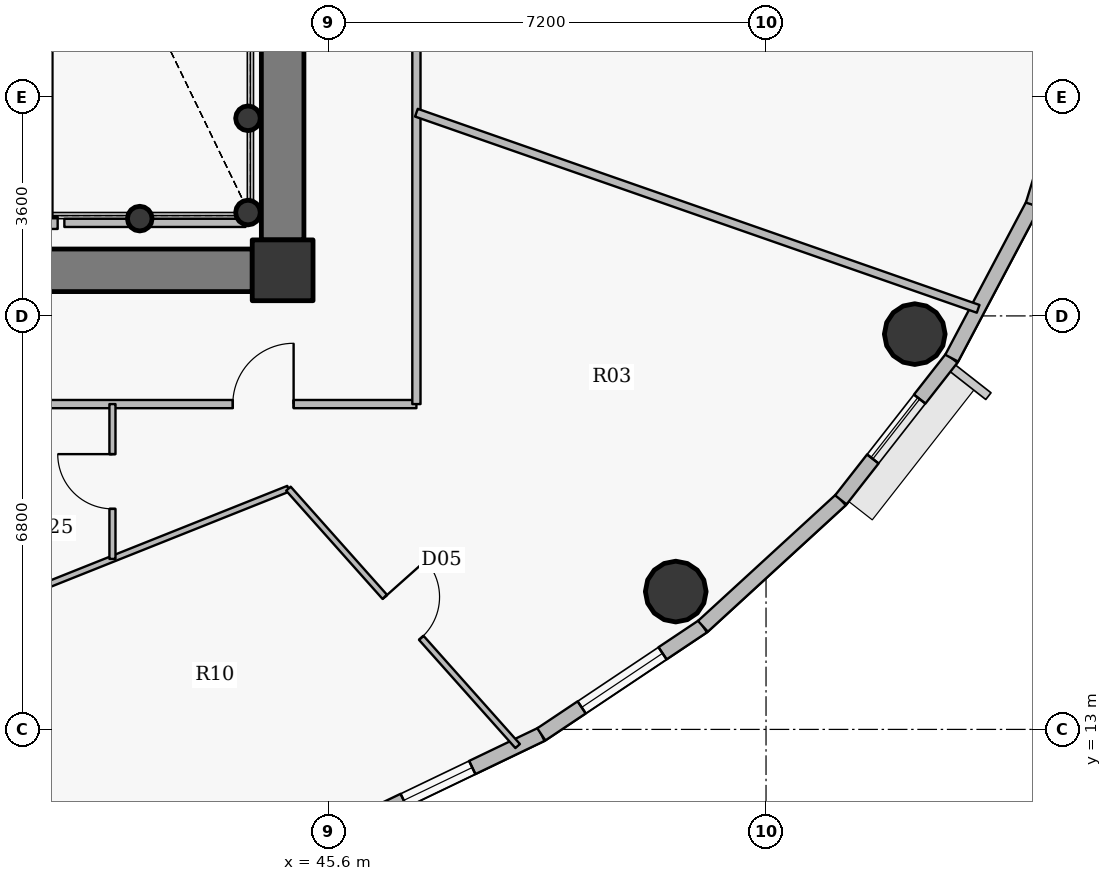
"""IFC4 building model, lengths in metres.
Left out: names, types, materials, properties, quantities, classifications, styles, units other than length and angle.
Written with IfcOpenShell. Run it as: python <this file> out.ifc"""

import sys

from ifc_helpers import new_model, si_unit, direction, frame, frame_2d, origin, origin_2d, place, context, subcontext, project, spatial, rectangle, hollow_circle, extrude, source, transform, mapped, element, fill, save


model = new_model("IFC4")
c1 = context("Model", 3, precision=1e-05, world=origin(), true_north=direction((0.0, 1.0)))
c2 = subcontext(c1, "Body", "Model", "MODEL_VIEW")
j1 = project(units=[si_unit("LENGTHUNIT", "METRE"), si_unit("PLANEANGLEUNIT", "RADIAN")], contexts=[c1])
p1 = place(None, origin())
s1 = spatial("IfcSite", under=j1, at=p1, CompositionType="ELEMENT")
p2 = place(p1, origin())
s2 = spatial("IfcBuilding", under=s1, at=p2, CompositionType="ELEMENT")
p3 = place(p2, frame((0.0, 0.0, 299.25)))
s3 = spatial("IfcBuildingStorey", under=s2, at=p3, CompositionType="ELEMENT", Elevation=299.25)
p4 = place(p3, frame((44.85, 20.55, 0.0), z_axis=(0.0, 0.0, 1.0), x_axis=(1.0, 0.0, 0.0)))
e1 = element("IfcColumn", 1, at=p4, inside=s3, PredefinedType="COLUMN", context=c2, shape_type="SweptSolid", body=[
    extrude(rectangle(XDim=1.0, YDim=1.0, at=origin_2d()), origin(), (0.0, 0.0, 1.0), 3.75),
])
for number, where, z_axis, x_axis in (
    (2, (44.28, 21.5, 0.0), (0.0, 0.0, 1.0), (1.0, 0.0, 0.0)),
    (3, (44.28, 23.05, 0.0), (0.0, 0.0, 1.0), (1.0, 0.0, 0.0)),
    (4, (42.5, 21.4, 0.0), (0.0, 0.0, 1.0), (1.0, 0.0, 0.0)),
):
    element("IfcColumn", number, at=place(p3, frame(where, z_axis=z_axis, x_axis=x_axis)), inside=s3, PredefinedType="COLUMN", context=c2, shape_type="SweptSolid", body=[
        extrude(hollow_circle(Radius=0.203, WallThickness=0.016, at=origin_2d()), origin(), (0.0, 0.0, 1.0), 3.75),
    ])
p5 = place(p3, frame((44.85, 32.95, 0.0), z_axis=(0.0, 0.0, 1.0), x_axis=(0.0, -1.0, 0.0)))
e5 = element("IfcWall", 5, at=p5, inside=s3, PredefinedType="SHEAR", context=c2, shape_type="SweptSolid", body=[
    extrude(rectangle(XDim=11.9, YDim=0.7, at=frame_2d((5.95, 0.0))), origin(), (0.0, 0.0, 1.0), 3.05),
])
p6 = place(p3, frame((44.35, 20.55, 0.0), z_axis=(0.0, 0.0, 1.0), x_axis=(-1.0, 0.0, 0.0)))
e6 = element("IfcWall", 6, at=p6, inside=s3, PredefinedType="SHEAR", context=c2, shape_type="SweptSolid", body=[
    extrude(rectangle(XDim=16.7, YDim=0.7, at=frame_2d((8.35, 0.0))), origin(), (0.0, 0.0, 1.0), 3.05),
])
p7 = place(p6, frame((12.925, 0.0, 0.0)))
e7 = element("IfcOpeningElement", 7, at=p7, cuts=e6, PredefinedType="OPENING", context=c2, shape_type="SweptSolid", body=[
    extrude(rectangle(XDim=1.15, YDim=2.15, at=origin_2d()), frame((0.575, 0.36, 1.075), z_axis=(0.0, -1.0, 0.0), x_axis=(1.0, 0.0, 0.0)), (0.0, 0.0, 1.0), 0.72),
])
p8 = place(p6, frame((9.1, 0.0, 0.0)))
e8 = element("IfcOpeningElement", 8, at=p8, cuts=e6, PredefinedType="OPENING", context=c2, shape_type="SweptSolid", body=[
    extrude(rectangle(XDim=1.15, YDim=2.15, at=origin_2d()), frame((0.575, 0.36, 1.075), z_axis=(0.0, -1.0, 0.0), x_axis=(1.0, 0.0, 0.0)), (0.0, 0.0, 1.0), 0.72),
])
for number, where, z_axis, x_axis in (
    (9, (51.315, 15.267, 0.0), (0.0, 0.0, 1.0), (1.0, 0.0, 0.0)),
    (10, (55.246, 19.5, 0.0), (0.0, 0.0, 1.0), (1.0, 0.0, 0.0)),
):
    element("IfcColumn", number, at=place(p3, frame(where, z_axis=z_axis, x_axis=x_axis)), inside=s3, PredefinedType="COLUMN", context=c2, shape_type="SweptSolid", body=[
        extrude(hollow_circle(Radius=0.5, WallThickness=0.032, at=origin_2d()), origin(), (0.0, 0.0, 1.0), 3.75),
    ])
p9 = place(p3, frame((49.104, 12.918, 0.0), z_axis=(0.0, 0.0, 1.0), x_axis=(-0.901573741254, -0.43262546051, 0.0)))
e11 = element("IfcWall", 11, at=p9, inside=s3, PredefinedType="SOLIDWALL", context=c2, shape_type="SweptSolid", body=[
    extrude(rectangle(XDim=3.307, YDim=0.24, at=frame_2d((1.653, 0.0))), origin(), (0.0, 0.0, 1.0), 3.5),
])
p10 = place(p9, frame((1.26, 0.0, 0.9)))
e12 = element("IfcOpeningElement", 12, at=p10, cuts=e11, PredefinedType="OPENING", context=c2, shape_type="SweptSolid", body=[
    extrude(rectangle(XDim=1.25, YDim=1.65, at=origin_2d()), frame((0.625, 0.13, 0.825), z_axis=(0.0, -1.0, 0.0), x_axis=(1.0, 0.0, 0.0)), (0.0, 0.0, 1.0), 0.26),
])
p11 = place(p3, frame((51.762, 14.696, 0.0), z_axis=(0.0, 0.0, 1.0), x_axis=(-0.831250592635, -0.55589787933, 0.0)))
e13 = element("IfcWall", 13, at=p11, inside=s3, PredefinedType="SOLIDWALL", context=c2, shape_type="SweptSolid", body=[
    extrude(rectangle(XDim=3.197, YDim=0.24, at=frame_2d((1.599, 0.0))), origin(), (0.0, 0.0, 1.0), 3.5),
])
p12 = place(p11, frame((0.799, 0.0, 0.9)))
e14 = element("IfcOpeningElement", 14, at=p12, cuts=e13, PredefinedType="OPENING", context=c2, shape_type="SweptSolid", body=[
    extrude(rectangle(XDim=1.6, YDim=1.75, at=origin_2d()), frame((0.8, 0.13, 0.875), z_axis=(0.0, -1.0, 0.0), x_axis=(1.0, 0.0, 0.0)), (0.0, 0.0, 1.0), 0.26),
])
p13 = place(p3, frame((54.03, 16.775, 0.0), z_axis=(0.0, 0.0, 1.0), x_axis=(-0.737068506972, -0.675818034703, 0.0)))
e15 = element("IfcWall", 15, at=p13, inside=s3, PredefinedType="SOLIDWALL", context=c2, shape_type="SweptSolid", body=[
    extrude(rectangle(XDim=3.077, YDim=0.24, at=frame_2d((1.539, 0.0))), origin(), (0.0, 0.0, 1.0), 3.5),
])
p14 = place(p3, frame((55.854, 19.105, 0.0), z_axis=(0.0, 0.0, 1.0), x_axis=(-0.616337186556, -0.787482363275, 0.0)))
e16 = element("IfcWall", 16, at=p14, inside=s3, PredefinedType="SOLIDWALL", context=c2, shape_type="SweptSolid", body=[
    extrude(rectangle(XDim=2.958, YDim=0.24, at=frame_2d((1.479, 0.0))), origin(), (0.0, 0.0, 1.0), 3.5),
])
p15 = place(p14, frame((0.854, 0.0, 0.9)))
e17 = element("IfcOpeningElement", 17, at=p15, cuts=e16, PredefinedType="OPENING", context=c2, shape_type="SweptSolid", body=[
    extrude(rectangle(XDim=1.25, YDim=1.65, at=origin_2d()), frame((0.625, 0.13, 0.825), z_axis=(0.0, -1.0, 0.0), x_axis=(1.0, 0.0, 0.0)), (0.0, 0.0, 1.0), 0.26),
])
p16 = place(p3, frame((57.188, 21.628, 0.0), z_axis=(0.0, 0.0, 1.0), x_axis=(-0.467628269026, -0.883925224218, 0.0)))
e18 = element("IfcWall", 18, at=p16, inside=s3, PredefinedType="SOLIDWALL", context=c2, shape_type="SweptSolid", body=[
    extrude(rectangle(XDim=2.854, YDim=0.24, at=frame_2d((1.427, 0.0))), origin(), (0.0, 0.0, 1.0), 3.5),
])
p17 = place(p3, frame((58.002, 24.281, 0.0), z_axis=(0.0, 0.0, 1.0), x_axis=(-0.2931213403, -0.956075248012, 0.0)))
e19 = element("IfcWall", 19, at=p17, inside=s3, PredefinedType="SOLIDWALL", context=c2, shape_type="SweptSolid", body=[
    extrude(rectangle(XDim=2.775, YDim=0.24, at=frame_2d((1.388, 0.0))), origin(), (0.0, 0.0, 1.0), 3.5),
])
p18 = place(p17, frame((0.763, 0.0, 0.9)))
e20 = element("IfcOpeningElement", 20, at=p18, cuts=e19, PredefinedType="OPENING", context=c2, shape_type="SweptSolid", body=[
    extrude(rectangle(XDim=1.25, YDim=1.65, at=origin_2d()), frame((0.625, 0.13, 0.825), z_axis=(0.0, -1.0, 0.0), x_axis=(1.0, 0.0, 0.0)), (0.0, 0.0, 1.0), 0.26),
])
p19 = place(p3, frame((24.95, 18.35, 0.0), z_axis=(0.0, 0.0, 1.0), x_axis=(1.0, 0.0, 0.0)))
e21 = element("IfcWall", 21, at=p19, inside=s3, PredefinedType="PARTITIONING", context=c2, shape_type="SweptSolid", body=[
    extrude(rectangle(XDim=22.1, YDim=0.135, at=frame_2d((11.05, 0.0))), origin(), (0.0, 0.0, 1.0), 3.035),
])
p20 = place(p19, frame((8.131, 0.0, 0.0)))
e22 = element("IfcOpeningElement", 22, at=p20, cuts=e21, PredefinedType="OPENING", context=c2, shape_type="SweptSolid", body=[
    extrude(rectangle(XDim=1.0, YDim=2.15, at=origin_2d()), frame((0.5, 0.078, 1.075), z_axis=(0.0, -1.0, 0.0), x_axis=(1.0, 0.0, 0.0)), (0.0, 0.0, 1.0), 0.155),
])
p21 = place(p19, frame((19.081, 0.0, 0.0)))
e23 = element("IfcOpeningElement", 23, at=p21, cuts=e21, PredefinedType="OPENING", context=c2, shape_type="SweptSolid", body=[
    extrude(rectangle(XDim=1.0, YDim=2.15, at=origin_2d()), frame((0.5, 0.078, 1.075), z_axis=(0.0, -1.0, 0.0), x_axis=(1.0, 0.0, 0.0)), (0.0, 0.0, 1.0), 0.155),
])
p22 = place(p3, frame((40.845, 15.323, 0.0), z_axis=(0.0, 0.0, 1.0), x_axis=(0.928815810282, 0.370541752804, 0.0)))
e24 = element("IfcWall", 24, at=p22, inside=s3, PredefinedType="PARTITIONING", context=c2, shape_type="SweptSolid", body=[
    extrude(rectangle(XDim=4.414, YDim=0.1, at=frame_2d((2.207, 0.0))), origin(), (0.0, 0.0, 1.0), 3.035),
])
p23 = place(p3, frame((40.9, 21.33, 0.0), z_axis=(0.0, 0.0, 1.0), x_axis=(1.0, 0.0, 0.0)))
e25 = element("IfcWall", 25, at=p23, inside=s3, PredefinedType="PARTITIONING", context=c2, shape_type="SweptSolid", body=[
    extrude(rectangle(XDim=0.25, YDim=0.2, at=frame_2d((0.125, 0.0))), origin(), (0.0, 0.0, 1.0), 3.035),
])
p24 = place(p3, frame((42.051, 15.804, 0.0), z_axis=(0.0, 0.0, 1.0), x_axis=(0.0, 1.0, 0.0)))
e26 = element("IfcWall", 26, at=p24, inside=s3, PredefinedType="PARTITIONING", context=c2, shape_type="SweptSolid", body=[
    extrude(rectangle(XDim=2.546, YDim=0.1, at=frame_2d((1.273, 0.0))), origin(), (0.0, 0.0, 1.0), 3.5),
])
p25 = place(p24, frame((0.823, 0.0, 0.0)))
e27 = element("IfcOpeningElement", 27, at=p25, cuts=e26, PredefinedType="OPENING", context=c2, shape_type="SweptSolid", body=[
    extrude(rectangle(XDim=0.9, YDim=2.1, at=origin_2d()), frame((0.45, 0.06, 1.05), z_axis=(0.0, -1.0, 0.0), x_axis=(1.0, 0.0, 0.0)), (0.0, 0.0, 1.0), 0.12),
])
p26 = place(p3, frame((44.945, 16.958, 0.0), z_axis=(0.0, 0.0, 1.0), x_axis=(0.665162818086, -0.746698349694, 0.0)))
e28 = element("IfcWall", 28, at=p26, inside=s3, PredefinedType="PARTITIONING", context=c2, shape_type="SweptSolid", body=[
    extrude(rectangle(XDim=5.668, YDim=0.1, at=frame_2d((2.834, 0.0))), origin(), (0.0, 0.0, 1.0), 2.985),
])
p27 = place(p26, frame((2.384, 0.0, 0.0)))
e29 = element("IfcOpeningElement", 29, at=p27, cuts=e28, PredefinedType="OPENING", context=c2, shape_type="SweptSolid", body=[
    extrude(rectangle(XDim=0.9, YDim=2.1, at=origin_2d()), frame((0.45, 0.06, 1.05), z_axis=(0.0, -1.0, 0.0), x_axis=(1.0, 0.0, 0.0)), (0.0, 0.0, 1.0), 0.12),
])
p28 = place(p3, frame((47.05, 18.35, 0.0), z_axis=(0.0, 0.0, 1.0), x_axis=(0.0, 1.0, 0.0)))
e30 = element("IfcWall", 30, at=p28, inside=s3, PredefinedType="PARTITIONING", context=c2, shape_type="SweptSolid", body=[
    extrude(rectangle(XDim=17.3, YDim=0.135, at=frame_2d((8.65, 0.0))), origin(), (0.0, 0.0, 1.0), 3.035),
])
p29 = place(p28, frame((6.155, 0.0, 0.0)))
e31 = element("IfcOpeningElement", 31, at=p29, cuts=e30, PredefinedType="OPENING", context=c2, shape_type="SweptSolid", body=[
    extrude(rectangle(XDim=1.0, YDim=2.15, at=origin_2d()), frame((0.5, 0.078, 1.075), z_axis=(0.0, -1.0, 0.0), x_axis=(1.0, 0.0, 0.0)), (0.0, 0.0, 1.0), 0.155),
])
p30 = place(p3, frame((47.05, 23.142, 0.0), z_axis=(0.0, 0.0, 1.0), x_axis=(0.94410974345, -0.329631297547, 0.0)))
e32 = element("IfcWall", 32, at=p30, inside=s3, PredefinedType="PARTITIONING", context=c2, shape_type="SweptSolid", body=[
    extrude(rectangle(XDim=9.785, YDim=0.135, at=frame_2d((4.893, 0.0))), origin(), (0.0, 0.0, 1.0), 2.985),
])
p31 = place(p3, frame((44.24, 21.33, 0.0), z_axis=(0.0, 0.0, 1.0), x_axis=(-1.0, 0.0, 0.0)))
e33 = element("IfcWall", 33, at=p31, inside=s3, PredefinedType="PARTITIONING", context=c2, shape_type="SweptSolid", body=[
    extrude(rectangle(XDim=2.98, YDim=0.135, at=frame_2d((1.49, 0.0))), origin(), (0.0, 0.0, 1.0), 3.035),
])
p32 = place(p3, frame((44.36, 20.2, 0.0), z_axis=(0.0, 0.0, 1.0), x_axis=(1.0, 0.0, 0.0)))
e34 = element("IfcWall", 34, at=p32, inside=s3, PredefinedType="PARTITIONING", context=c2, shape_type="SweptSolid", body=[
    extrude(rectangle(XDim=0.84, YDim=0.135, at=frame_2d((0.42, 0.0))), origin(), (0.0, 0.0, 1.0), 3.035),
])
p33 = place(p3, frame((45.2, 20.508, 0.0), z_axis=(0.0, 0.0, 1.0), x_axis=(0.0, 1.0, 0.0)))
e35 = element("IfcWall", 35, at=p33, inside=s3, PredefinedType="PARTITIONING", context=c2, shape_type="SweptSolid", body=[
    extrude(rectangle(XDim=0.532, YDim=0.135, at=frame_2d((0.266, 0.0))), origin(), (0.0, 0.0, 1.0), 3.5),
])
m1 = source(origin(), c2, "Body", "SweptSolid", [
    extrude(rectangle(XDim=1.25, YDim=1.65, at=origin_2d()), frame((0.625, 0.03, 0.825), z_axis=(0.0, -1.0, 0.0), x_axis=(1.0, 0.0, 0.0)), (0.0, 0.0, 1.0), 0.06),
])
p34 = place(p10, origin())
e36 = element("IfcWindow", 36, at=p34, inside=s3, PartitioningType="SINGLE_PANEL", PredefinedType="WINDOW", context=c2, shape_type="MappedRepresentation", body=[
    mapped(m1, transform((0.0, 0.0, 0.0), x_axis=(1.0, 0.0, 0.0), y_axis=(0.0, 1.0, 0.0), z_axis=(0.0, 0.0, 1.0), scale=1.0)),
])
fill(e12, e36)
m2 = source(origin(), c2, "Body", "SweptSolid", [
    extrude(rectangle(XDim=1.6, YDim=1.75, at=origin_2d()), frame((0.8, 0.03, 0.875), z_axis=(0.0, -1.0, 0.0), x_axis=(1.0, 0.0, 0.0)), (0.0, 0.0, 1.0), 0.06),
])
p35 = place(p12, origin())
e37 = element("IfcWindow", 37, at=p35, inside=s3, PartitioningType="DOUBLE_PANEL_VERTICAL", PredefinedType="WINDOW", context=c2, shape_type="MappedRepresentation", body=[
    mapped(m2, transform((0.0, 0.0, 0.0), x_axis=(1.0, 0.0, 0.0), y_axis=(0.0, 1.0, 0.0), z_axis=(0.0, 0.0, 1.0), scale=1.0)),
])
fill(e14, e37)
p36 = place(p15, origin())
e38 = element("IfcWindow", 38, at=p36, inside=s3, PartitioningType="SINGLE_PANEL", PredefinedType="WINDOW", context=c2, shape_type="MappedRepresentation", body=[
    mapped(m1, transform((0.0, 0.0, 0.0), x_axis=(1.0, 0.0, 0.0), y_axis=(0.0, 1.0, 0.0), z_axis=(0.0, 0.0, 1.0), scale=1.0)),
])
fill(e17, e38)
m3 = source(origin(), c2, "Body", "SweptSolid", [
    extrude(rectangle(XDim=1.0, YDim=2.15, at=origin_2d()), frame((0.5, 0.025, 1.075), z_axis=(0.0, -1.0, 0.0), x_axis=(1.0, 0.0, 0.0)), (0.0, 0.0, 1.0), 0.05),
])
p37 = place(p21, origin())
e39 = element("IfcDoor", 39, at=p37, inside=s3, OperationType="SINGLE_SWING_RIGHT", PredefinedType="DOOR", context=c2, shape_type="MappedRepresentation", body=[
    mapped(m3, transform((0.0, 0.0, 0.0), x_axis=(1.0, 0.0, 0.0), y_axis=(0.0, 1.0, 0.0), z_axis=(0.0, 0.0, 1.0), scale=1.0)),
])
fill(e23, e39)
m4 = source(origin(), c2, "Body", "SweptSolid", [
    extrude(rectangle(XDim=0.9, YDim=2.1, at=origin_2d()), frame((0.45, 0.025, 1.05), z_axis=(0.0, -1.0, 0.0), x_axis=(1.0, 0.0, 0.0)), (0.0, 0.0, 1.0), 0.05),
])
p38 = place(p27, origin())
e40 = element("IfcDoor", 40, at=p38, inside=s3, OperationType="SINGLE_SWING_LEFT", PredefinedType="DOOR", context=c2, shape_type="MappedRepresentation", body=[
    mapped(m4, transform((0.0, 0.0, 0.0), x_axis=(1.0, 0.0, 0.0), y_axis=(0.0, 1.0, 0.0), z_axis=(0.0, 0.0, 1.0), scale=1.0)),
])
fill(e29, e40)
p39 = place(p25, origin())
e41 = element("IfcDoor", 41, at=p39, inside=s3, OperationType="SINGLE_SWING_RIGHT", PredefinedType="DOOR", context=c2, shape_type="MappedRepresentation", body=[
    mapped(m4, transform((0.0, 0.0, 0.0), x_axis=(1.0, 0.0, 0.0), y_axis=(0.0, 1.0, 0.0), z_axis=(0.0, 0.0, 1.0), scale=1.0)),
])
fill(e27, e41)
save(model, sys.argv[1])
